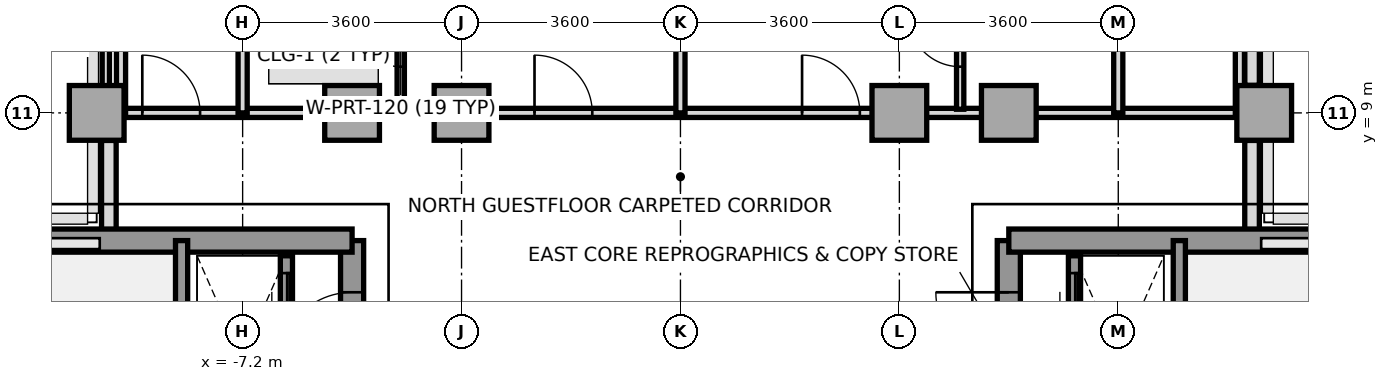
"""IFC4 building model, lengths in metres.
Left out: names, types, materials, properties, quantities, classifications, styles, units other than length and angle.
Written with IfcOpenShell. Run it as: python <this file> out.ifc"""

import sys

from ifc_helpers import new_model, si_unit, direction, frame, frame_2d, origin, origin_2d, place, context, subcontext, project, spatial, rectangle, extrude, source, transform, mapped, element, fill, save


model = new_model("IFC4")
c1 = context("Model", 3, precision=1e-05, world=origin(), true_north=direction((0.0, 1.0)))
c2 = subcontext(c1, "Body", "Model", "MODEL_VIEW")
j1 = project(units=[si_unit("LENGTHUNIT", "METRE"), si_unit("PLANEANGLEUNIT", "RADIAN")], contexts=[c1])
p1 = place(None, origin())
s1 = spatial("IfcSite", under=j1, at=p1, CompositionType="ELEMENT")
p2 = place(p1, origin())
s2 = spatial("IfcBuilding", under=s1, at=p2, CompositionType="ELEMENT")
p3 = place(p2, frame((0.0, 0.0, 184.2)))
s3 = spatial("IfcBuildingStorey", under=s2, at=p3, CompositionType="ELEMENT", Elevation=184.2)
m1 = source(origin(), c2, "Body", "SweptSolid", [
    extrude(rectangle(XDim=0.9, YDim=0.9, at=origin_2d()), origin(), (0.0, 0.0, 1.0), 3.2),
])
for number, where, z_axis, x_axis in (
    (1, (-9.6, 9.0, 0.0), (0.0, 0.0, 1.0), (1.0, 0.0, 0.0)),
    (2, (-5.4, 9.0, 0.0), (0.0, 0.0, 1.0), (1.0, 0.0, 0.0)),
    (3, (-3.6, 9.0, 0.0), (0.0, 0.0, 1.0), (1.0, 0.0, 0.0)),
    (4, (3.6, 9.0, 0.0), (0.0, 0.0, 1.0), (1.0, 0.0, 0.0)),
    (5, (5.4, 9.0, 0.0), (0.0, 0.0, 1.0), (1.0, 0.0, 0.0)),
    (6, (9.6, 9.0, 0.0), (0.0, 0.0, 1.0), (1.0, 0.0, 0.0)),
):
    element("IfcColumn", number, at=place(p3, frame(where, z_axis=z_axis, x_axis=x_axis)), inside=s3, PredefinedType="COLUMN", context=c2, shape_type="MappedRepresentation", body=[
        mapped(m1, transform((0.0, 0.0, 0.0), x_axis=(1.0, 0.0, 0.0), y_axis=(0.0, 1.0, 0.0), z_axis=(0.0, 0.0, 1.0), scale=1.0)),
    ])
p4 = place(p3, frame((-9.4, 6.953, 0.0), z_axis=(0.0, 0.0, 1.0), x_axis=(0.0, 1.0, 0.0)))
e7 = element("IfcWall", 7, at=p4, inside=s3, PredefinedType="PARAPET", context=c2, shape_type="SweptSolid", body=[
    extrude(rectangle(XDim=1.594, YDim=0.24, at=frame_2d((0.797, 0.0))), origin(), (0.0, 0.0, 1.0), 1.15),
])
p5 = place(p3, frame((9.4, 15.358, 0.0), z_axis=(0.0, 0.0, 1.0), x_axis=(0.0, -1.0, 0.0)))
e8 = element("IfcWall", 8, at=p5, inside=s3, PredefinedType="PARAPET", context=c2, shape_type="SweptSolid", body=[
    extrude(rectangle(XDim=5.905, YDim=0.24, at=frame_2d((2.952, 0.0))), origin(), (0.0, 0.0, 1.0), 1.15),
])
p6 = place(p3, frame((9.4, 8.547, 0.0), z_axis=(0.0, 0.0, 1.0), x_axis=(0.0, -1.0, 0.0)))
e9 = element("IfcWall", 9, at=p6, inside=s3, PredefinedType="PARAPET", context=c2, shape_type="SweptSolid", body=[
    extrude(rectangle(XDim=1.594, YDim=0.24, at=frame_2d((0.797, 0.0))), origin(), (0.0, 0.0, 1.0), 1.15),
])
p7 = place(p3, frame((-5.4, -5.6, 0.0), z_axis=(0.0, 0.0, 1.0), x_axis=(0.0, 1.0, 0.0)))
e10 = element("IfcWall", 10, at=p7, inside=s3, PredefinedType="SHEAR", context=c2, shape_type="SweptSolid", body=[
    extrude(rectangle(XDim=12.5, YDim=0.38, at=frame_2d((6.25, 0.0))), origin(), (0.0, 0.0, 1.0), 3.2),
])
p8 = place(p7, frame((4.55, 0.0, 0.0)))
e11 = element("IfcOpeningElement", 11, at=p8, cuts=e10, PredefinedType="OPENING", context=c2, shape_type="SweptSolid", body=[
    extrude(rectangle(XDim=1.2, YDim=2.2, at=frame_2d((0.6, 1.1))), frame((0.0, 0.2, 0.0), z_axis=(0.0, -1.0, 0.0), x_axis=(1.0, 0.0, 0.0)), (0.0, 0.0, 1.0), 0.4),
])
p9 = place(p7, frame((10.45, 0.0, 0.0)))
e12 = element("IfcOpeningElement", 12, at=p9, cuts=e10, PredefinedType="OPENING", context=c2, shape_type="SweptSolid", body=[
    extrude(rectangle(XDim=1.2, YDim=2.2, at=frame_2d((0.6, 1.1))), frame((0.0, 0.2, 0.0), z_axis=(0.0, -1.0, 0.0), x_axis=(1.0, 0.0, 0.0)), (0.0, 0.0, 1.0), 0.4),
])
p10 = place(p7, frame((6.86, 0.0, 0.0)))
e13 = element("IfcOpeningElement", 13, at=p10, cuts=e10, PredefinedType="OPENING", context=c2, shape_type="SweptSolid", body=[
    extrude(rectangle(XDim=0.8, YDim=2.1, at=frame_2d((0.4, 1.05))), frame((0.0, 0.2, 0.0), z_axis=(0.0, -1.0, 0.0), x_axis=(1.0, 0.0, 0.0)), (0.0, 0.0, 1.0), 0.4),
])
p11 = place(p3, frame((-11.356, 6.9, 0.0), z_axis=(0.0, 0.0, 1.0), x_axis=(1.0, 0.0, 0.0)))
e14 = element("IfcWall", 14, at=p11, inside=s3, PredefinedType="SHEAR", context=c2, shape_type="SweptSolid", body=[
    extrude(rectangle(XDim=5.956, YDim=0.38, at=frame_2d((2.978, 0.0))), origin(), (0.0, 0.0, 1.0), 3.2),
])
p12 = place(p3, frame((-8.204, -0.016, 0.0), z_axis=(0.0, 0.0, 1.0), x_axis=(0.0, 1.0, 0.0)))
e15 = element("IfcWall", 15, at=p12, inside=s3, PredefinedType="SOLIDWALL", context=c2, shape_type="SweptSolid", body=[
    extrude(rectangle(XDim=6.916, YDim=0.2, at=frame_2d((3.458, 0.0))), origin(), (0.0, 0.0, 1.0), 3.2),
])
p13 = place(p12, frame((0.2, 0.0, 0.0)))
e16 = element("IfcOpeningElement", 16, at=p13, cuts=e15, PredefinedType="OPENING", context=c2, shape_type="SweptSolid", body=[
    extrude(rectangle(XDim=1.2, YDim=2.2, at=frame_2d((0.6, 1.1))), frame((0.0, 0.11, 0.0), z_axis=(0.0, -1.0, 0.0), x_axis=(1.0, 0.0, 0.0)), (0.0, 0.0, 1.0), 0.22),
])
p14 = place(p3, frame((5.4, -5.6, 0.0), z_axis=(0.0, 0.0, 1.0), x_axis=(0.0, 1.0, 0.0)))
e17 = element("IfcWall", 17, at=p14, inside=s3, PredefinedType="SHEAR", context=c2, shape_type="SweptSolid", body=[
    extrude(rectangle(XDim=12.5, YDim=0.38, at=frame_2d((6.25, 0.0))), origin(), (0.0, 0.0, 1.0), 3.2),
])
p15 = place(p14, frame((4.55, 0.0, 0.0)))
e18 = element("IfcOpeningElement", 18, at=p15, cuts=e17, PredefinedType="OPENING", context=c2, shape_type="SweptSolid", body=[
    extrude(rectangle(XDim=1.2, YDim=2.2, at=frame_2d((0.6, 1.1))), frame((0.0, 0.2, 0.0), z_axis=(0.0, -1.0, 0.0), x_axis=(1.0, 0.0, 0.0)), (0.0, 0.0, 1.0), 0.4),
])
p16 = place(p14, frame((10.45, 0.0, 0.0)))
e19 = element("IfcOpeningElement", 19, at=p16, cuts=e17, PredefinedType="OPENING", context=c2, shape_type="SweptSolid", body=[
    extrude(rectangle(XDim=1.2, YDim=2.2, at=frame_2d((0.6, 1.1))), frame((0.0, 0.2, 0.0), z_axis=(0.0, -1.0, 0.0), x_axis=(1.0, 0.0, 0.0)), (0.0, 0.0, 1.0), 0.4),
])
p17 = place(p14, frame((6.86, 0.0, 0.0)))
e20 = element("IfcOpeningElement", 20, at=p17, cuts=e17, PredefinedType="OPENING", context=c2, shape_type="SweptSolid", body=[
    extrude(rectangle(XDim=0.8, YDim=2.1, at=frame_2d((0.4, 1.05))), frame((0.0, 0.2, 0.0), z_axis=(0.0, -1.0, 0.0), x_axis=(1.0, 0.0, 0.0)), (0.0, 0.0, 1.0), 0.4),
])
p18 = place(p14, frame((7.88, 0.0, 0.0)))
e21 = element("IfcOpeningElement", 21, at=p18, cuts=e17, PredefinedType="OPENING", context=c2, shape_type="SweptSolid", body=[
    extrude(rectangle(XDim=0.8, YDim=2.1, at=frame_2d((0.4, 1.05))), frame((0.0, 0.2, 0.0), z_axis=(0.0, -1.0, 0.0), x_axis=(1.0, 0.0, 0.0)), (0.0, 0.0, 1.0), 0.4),
])
p19 = place(p3, frame((5.4, 6.9, 0.0), z_axis=(0.0, 0.0, 1.0), x_axis=(1.0, 0.0, 0.0)))
e22 = element("IfcWall", 22, at=p19, inside=s3, PredefinedType="SHEAR", context=c2, shape_type="SweptSolid", body=[
    extrude(rectangle(XDim=5.956, YDim=0.38, at=frame_2d((2.978, 0.0))), origin(), (0.0, 0.0, 1.0), 3.2),
])
p20 = place(p3, frame((8.204, -0.016, 0.0), z_axis=(0.0, 0.0, 1.0), x_axis=(0.0, 1.0, 0.0)))
e23 = element("IfcWall", 23, at=p20, inside=s3, PredefinedType="SOLIDWALL", context=c2, shape_type="SweptSolid", body=[
    extrude(rectangle(XDim=6.916, YDim=0.2, at=frame_2d((3.458, 0.0))), origin(), (0.0, 0.0, 1.0), 3.2),
])
p21 = place(p20, frame((0.2, 0.0, 0.0)))
e24 = element("IfcOpeningElement", 24, at=p21, cuts=e23, PredefinedType="OPENING", context=c2, shape_type="SweptSolid", body=[
    extrude(rectangle(XDim=1.2, YDim=2.2, at=frame_2d((0.6, 1.1))), frame((0.0, 0.11, 0.0), z_axis=(0.0, -1.0, 0.0), x_axis=(1.0, 0.0, 0.0)), (0.0, 0.0, 1.0), 0.22),
])
p22 = place(p3, frame((-6.48, 4.98, 0.0), z_axis=(0.0, 0.0, 1.0), x_axis=(0.0, 1.0, 0.0)))
e25 = element("IfcWall", 25, at=p22, inside=s3, PredefinedType="SOLIDWALL", context=c2, shape_type="SweptSolid", body=[
    extrude(rectangle(XDim=1.67, YDim=0.2, at=frame_2d((0.835, 0.0))), origin(), (0.0, 0.0, 1.0), 3.2),
])
p23 = place(p22, frame((0.285, 0.0, 0.0)))
e26 = element("IfcOpeningElement", 26, at=p23, cuts=e25, PredefinedType="OPENING", context=c2, shape_type="SweptSolid", body=[
    extrude(rectangle(XDim=1.1, YDim=2.2, at=frame_2d((0.55, 1.1))), frame((0.0, 0.11, 0.0), z_axis=(0.0, -1.0, 0.0), x_axis=(1.0, 0.0, 0.0)), (0.0, 0.0, 1.0), 0.22),
])
p24 = place(p3, frame((6.48, 4.98, 0.0), z_axis=(0.0, 0.0, 1.0), x_axis=(0.0, 1.0, 0.0)))
e27 = element("IfcWall", 27, at=p24, inside=s3, PredefinedType="SOLIDWALL", context=c2, shape_type="SweptSolid", body=[
    extrude(rectangle(XDim=1.67, YDim=0.2, at=frame_2d((0.835, 0.0))), origin(), (0.0, 0.0, 1.0), 3.2),
])
p25 = place(p24, frame((0.285, 0.0, 0.0)))
e28 = element("IfcOpeningElement", 28, at=p25, cuts=e27, PredefinedType="OPENING", context=c2, shape_type="SweptSolid", body=[
    extrude(rectangle(XDim=1.1, YDim=2.2, at=frame_2d((0.55, 1.1))), frame((0.0, 0.11, 0.0), z_axis=(0.0, -1.0, 0.0), x_axis=(1.0, 0.0, 0.0)), (0.0, 0.0, 1.0), 0.22),
])
p26 = place(p3, frame((-9.55, 9.0, 0.0), z_axis=(0.0, 0.0, 1.0), x_axis=(1.0, 0.0, 0.0)))
e29 = element("IfcWall", 29, at=p26, inside=s3, PredefinedType="PARTITIONING", context=c2, shape_type="SweptSolid", body=[
    extrude(rectangle(XDim=19.1, YDim=0.15, at=frame_2d((9.55, 0.0))), origin(), (0.0, 0.0, 1.0), 2.75),
])
p27 = place(p26, frame((0.7, 0.0, 0.0)))
e30 = element("IfcOpeningElement", 30, at=p27, cuts=e29, PredefinedType="OPENING", context=c2, shape_type="SweptSolid", body=[
    extrude(rectangle(XDim=0.95, YDim=2.15, at=frame_2d((0.475, 1.075))), frame((0.0, 0.085, 0.0), z_axis=(0.0, -1.0, 0.0), x_axis=(1.0, 0.0, 0.0)), (0.0, 0.0, 1.0), 0.17),
])
p28 = place(p26, frame((7.15, 0.0, 0.0)))
e31 = element("IfcOpeningElement", 31, at=p28, cuts=e29, PredefinedType="OPENING", context=c2, shape_type="SweptSolid", body=[
    extrude(rectangle(XDim=0.95, YDim=2.15, at=frame_2d((0.475, 1.075))), frame((0.0, 0.085, 0.0), z_axis=(0.0, -1.0, 0.0), x_axis=(1.0, 0.0, 0.0)), (0.0, 0.0, 1.0), 0.17),
])
p29 = place(p26, frame((11.55, 0.0, 0.0)))
e32 = element("IfcOpeningElement", 32, at=p29, cuts=e29, PredefinedType="OPENING", context=c2, shape_type="SweptSolid", body=[
    extrude(rectangle(XDim=0.95, YDim=2.15, at=frame_2d((0.475, 1.075))), frame((0.0, 0.085, 0.0), z_axis=(0.0, -1.0, 0.0), x_axis=(1.0, 0.0, 0.0)), (0.0, 0.0, 1.0), 0.17),
])
for number, where, z_axis, x_axis in (
    (33, (-9.2, 9.0, 0.0), (0.0, 0.0, 1.0), (0.0, 1.0, 0.0)),
    (34, (9.2, 9.0, 0.0), (0.0, 0.0, 1.0), (0.0, 1.0, 0.0)),
):
    element("IfcWall", number, at=place(p3, frame(where, z_axis=z_axis, x_axis=x_axis)), inside=s3, PredefinedType="PARTITIONING", context=c2, shape_type="SweptSolid", body=[
        extrude(rectangle(XDim=6.68, YDim=0.15, at=frame_2d((3.34, 0.0))), origin(), (0.0, 0.0, 1.0), 2.75),
    ])
p30 = place(p3, frame((-7.2, 9.0, 0.0), z_axis=(0.0, 0.0, 1.0), x_axis=(0.0, 1.0, 0.0)))
e35 = element("IfcWall", 35, at=p30, inside=s3, PredefinedType="PARTITIONING", context=c2, shape_type="SweptSolid", body=[
    extrude(rectangle(XDim=14.4, YDim=0.15, at=frame_2d((7.2, 0.0))), origin(), (0.0, 0.0, 1.0), 2.75),
])
p31 = place(p3, frame((0.0, 9.0, 0.0), z_axis=(0.0, 0.0, 1.0), x_axis=(0.0, 1.0, 0.0)))
e36 = element("IfcWall", 36, at=p31, inside=s3, PredefinedType="PARTITIONING", context=c2, shape_type="SweptSolid", body=[
    extrude(rectangle(XDim=15.65, YDim=0.15, at=frame_2d((7.825, 0.0))), origin(), (0.0, 0.0, 1.0), 2.75),
])
p32 = place(p3, frame((7.2, 9.0, 0.0), z_axis=(0.0, 0.0, 1.0), x_axis=(0.0, 1.0, 0.0)))
e37 = element("IfcWall", 37, at=p32, inside=s3, PredefinedType="PARTITIONING", context=c2, shape_type="SweptSolid", body=[
    extrude(rectangle(XDim=14.4, YDim=0.15, at=frame_2d((7.2, 0.0))), origin(), (0.0, 0.0, 1.0), 2.75),
])
p33 = place(p3, frame((-9.45, 9.0, 0.0), z_axis=(0.0, 0.0, 1.0), x_axis=(0.0, 1.0, 0.0)))
e38 = element("IfcWall", 38, at=p33, inside=s3, PredefinedType="PARTITIONING", context=c2, shape_type="SweptSolid", body=[
    extrude(rectangle(XDim=4.0, YDim=0.12, at=frame_2d((2.0, 0.0))), origin(), (0.0, 0.0, 1.0), 3.2),
])
p34 = place(p3, frame((-4.6, 9.06, 0.0), z_axis=(0.0, 0.0, 1.0), x_axis=(0.0, 1.0, 0.0)))
e39 = element("IfcWall", 39, at=p34, inside=s3, PredefinedType="PARTITIONING", context=c2, shape_type="SweptSolid", body=[
    extrude(rectangle(XDim=2.64, YDim=0.12, at=frame_2d((1.32, 0.0))), origin(), (0.0, 0.0, 1.0), 3.2),
])
p35 = place(p34, frame((0.7, 0.0, 0.0)))
e40 = element("IfcOpeningElement", 40, at=p35, cuts=e39, PredefinedType="OPENING", context=c2, shape_type="SweptSolid", body=[
    extrude(rectangle(XDim=0.85, YDim=2.1, at=frame_2d((0.425, 1.05))), frame((0.0, 0.07, 0.0), z_axis=(0.0, -1.0, 0.0), x_axis=(1.0, 0.0, 0.0)), (0.0, 0.0, 1.0), 0.14),
])
p36 = place(p3, frame((4.6, 9.06, 0.0), z_axis=(0.0, 0.0, 1.0), x_axis=(0.0, 1.0, 0.0)))
e41 = element("IfcWall", 41, at=p36, inside=s3, PredefinedType="PARTITIONING", context=c2, shape_type="SweptSolid", body=[
    extrude(rectangle(XDim=2.64, YDim=0.12, at=frame_2d((1.32, 0.0))), origin(), (0.0, 0.0, 1.0), 3.2),
])
p37 = place(p36, frame((0.7, 0.0, 0.0)))
e42 = element("IfcOpeningElement", 42, at=p37, cuts=e41, PredefinedType="OPENING", context=c2, shape_type="SweptSolid", body=[
    extrude(rectangle(XDim=0.85, YDim=2.1, at=frame_2d((0.425, 1.05))), frame((0.0, 0.07, 0.0), z_axis=(0.0, -1.0, 0.0), x_axis=(1.0, 0.0, 0.0)), (0.0, 0.0, 1.0), 0.14),
])
m2 = source(origin(), c2, "Body", "SweptSolid", [
    extrude(rectangle(XDim=1.2, YDim=2.2, at=frame_2d((0.6, 1.1))), frame((0.0, 0.025, 0.0), z_axis=(0.0, -1.0, 0.0), x_axis=(1.0, 0.0, 0.0)), (0.0, 0.0, 1.0), 0.05),
])
p38 = place(p9, origin())
e43 = element("IfcDoor", 43, at=p38, inside=s3, OperationType="SINGLE_SWING_LEFT", PredefinedType="DOOR", context=c2, shape_type="MappedRepresentation", body=[
    mapped(m2, transform((0.0, 0.0, 0.0), x_axis=(1.0, 0.0, 0.0), y_axis=(0.0, 1.0, 0.0), z_axis=(0.0, 0.0, 1.0), scale=1.0)),
])
fill(e12, e43)
p39 = place(p16, origin())
e44 = element("IfcDoor", 44, at=p39, inside=s3, OperationType="SINGLE_SWING_RIGHT", PredefinedType="DOOR", context=c2, shape_type="MappedRepresentation", body=[
    mapped(m2, transform((0.0, 0.0, 0.0), x_axis=(1.0, 0.0, 0.0), y_axis=(0.0, 1.0, 0.0), z_axis=(0.0, 0.0, 1.0), scale=1.0)),
])
fill(e19, e44)
m3 = source(origin(), c2, "Body", "SweptSolid", [
    extrude(rectangle(XDim=1.1, YDim=2.2, at=frame_2d((0.55, 1.1))), frame((0.0, 0.025, 0.0), z_axis=(0.0, -1.0, 0.0), x_axis=(1.0, 0.0, 0.0)), (0.0, 0.0, 1.0), 0.05),
])
p40 = place(p23, origin())
e45 = element("IfcDoor", 45, at=p40, inside=s3, OperationType="SLIDING_TO_LEFT", PredefinedType="DOOR", context=c2, shape_type="MappedRepresentation", body=[
    mapped(m3, transform((0.0, 0.0, 0.0), x_axis=(1.0, 0.0, 0.0), y_axis=(0.0, 1.0, 0.0), z_axis=(0.0, 0.0, 1.0), scale=1.0)),
])
fill(e26, e45)
p41 = place(p25, origin())
e46 = element("IfcDoor", 46, at=p41, inside=s3, OperationType="SLIDING_TO_LEFT", PredefinedType="DOOR", context=c2, shape_type="MappedRepresentation", body=[
    mapped(m3, transform((0.0, 0.0, 0.0), x_axis=(1.0, 0.0, 0.0), y_axis=(0.0, 1.0, 0.0), z_axis=(0.0, 0.0, 1.0), scale=1.0)),
])
fill(e28, e46)
m4 = source(origin(), c2, "Body", "SweptSolid", [
    extrude(rectangle(XDim=0.95, YDim=2.15, at=frame_2d((0.475, 1.075))), frame((0.0, 0.025, 0.0), z_axis=(0.0, -1.0, 0.0), x_axis=(1.0, 0.0, 0.0)), (0.0, 0.0, 1.0), 0.05),
])
p42 = place(p27, origin())
e47 = element("IfcDoor", 47, at=p42, inside=s3, OperationType="SINGLE_SWING_LEFT", PredefinedType="DOOR", context=c2, shape_type="MappedRepresentation", body=[
    mapped(m4, transform((0.0, 0.0, 0.0), x_axis=(1.0, 0.0, 0.0), y_axis=(0.0, 1.0, 0.0), z_axis=(0.0, 0.0, 1.0), scale=1.0)),
])
fill(e30, e47)
m5 = source(origin(), c2, "Body", "SweptSolid", [
    extrude(rectangle(XDim=0.85, YDim=2.1, at=frame_2d((0.425, 1.05))), frame((0.0, 0.025, 0.0), z_axis=(0.0, -1.0, 0.0), x_axis=(1.0, 0.0, 0.0)), (0.0, 0.0, 1.0), 0.05),
])
p43 = place(p35, origin())
e48 = element("IfcDoor", 48, at=p43, inside=s3, OperationType="SINGLE_SWING_RIGHT", PredefinedType="DOOR", context=c2, shape_type="MappedRepresentation", body=[
    mapped(m5, transform((0.0, 0.0, 0.0), x_axis=(1.0, 0.0, 0.0), y_axis=(0.0, 1.0, 0.0), z_axis=(0.0, 0.0, 1.0), scale=1.0)),
])
fill(e40, e48)
p44 = place(p28, origin())
e49 = element("IfcDoor", 49, at=p44, inside=s3, OperationType="SINGLE_SWING_LEFT", PredefinedType="DOOR", context=c2, shape_type="MappedRepresentation", body=[
    mapped(m4, transform((0.0, 0.0, 0.0), x_axis=(1.0, 0.0, 0.0), y_axis=(0.0, 1.0, 0.0), z_axis=(0.0, 0.0, 1.0), scale=1.0)),
])
fill(e31, e49)
p45 = place(p37, origin())
e50 = element("IfcDoor", 50, at=p45, inside=s3, OperationType="SINGLE_SWING_RIGHT", PredefinedType="DOOR", context=c2, shape_type="MappedRepresentation", body=[
    mapped(m5, transform((0.0, 0.0, 0.0), x_axis=(1.0, 0.0, 0.0), y_axis=(0.0, 1.0, 0.0), z_axis=(0.0, 0.0, 1.0), scale=1.0)),
])
fill(e42, e50)
p46 = place(p29, origin())
e51 = element("IfcDoor", 51, at=p46, inside=s3, OperationType="SINGLE_SWING_LEFT", PredefinedType="DOOR", context=c2, shape_type="MappedRepresentation", body=[
    mapped(m4, transform((0.0, 0.0, 0.0), x_axis=(1.0, 0.0, 0.0), y_axis=(0.0, 1.0, 0.0), z_axis=(0.0, 0.0, 1.0), scale=1.0)),
])
fill(e32, e51)
save(model, sys.argv[1])
